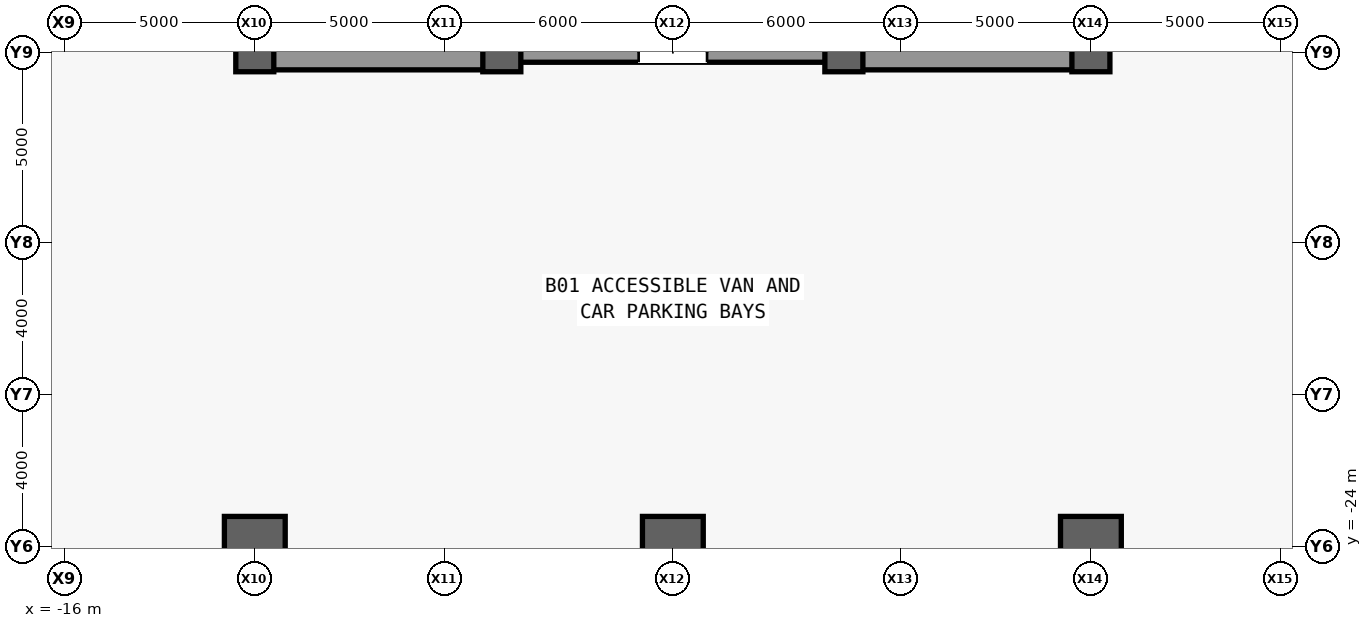
"""IFC4 building model, lengths in metres.
Left out: names, types, materials, properties, quantities, classifications, styles, units other than length and angle.
Written with IfcOpenShell. Run it as: python <this file> out.ifc"""

import sys

from ifc_helpers import new_model, si_unit, direction, frame, frame_2d, origin, origin_2d, place, context, subcontext, project, spatial, rectangle, extrude, source, transform, mapped, element, fill, save


model = new_model("IFC4")
c1 = context("Model", 3, precision=1e-05, world=origin(), true_north=direction((0.0, 1.0)))
c2 = subcontext(c1, "Body", "Model", "MODEL_VIEW")
j1 = project(units=[si_unit("LENGTHUNIT", "METRE"), si_unit("PLANEANGLEUNIT", "RADIAN")], contexts=[c1])
p1 = place(None, origin())
s1 = spatial("IfcSite", under=j1, at=p1, CompositionType="ELEMENT")
p2 = place(p1, origin())
s2 = spatial("IfcBuilding", under=s1, at=p2, CompositionType="ELEMENT")
p3 = place(p2, frame((0.0, 0.0, -4.8)))
s3 = spatial("IfcBuildingStorey", under=s2, at=p3, CompositionType="ELEMENT", Elevation=-4.8)
m1 = source(origin(), c2, "Body", "SweptSolid", [
    extrude(rectangle(XDim=22.0, YDim=0.6, at=frame_2d((11.0, 0.0))), origin(), (0.0, 0.0, 1.0), 4.48),
])
p4 = place(p3, frame((-11.0, -11.0, 0.0), z_axis=(0.0, 0.0, 1.0), x_axis=(0.0, 1.0, 0.0)))
e1 = element("IfcWall", 1, at=p4, inside=s3, PredefinedType="SHEAR", context=c2, shape_type="MappedRepresentation", body=[
    mapped(m1, transform((0.0, 0.0, 0.0), scale=1.0)),
])
m2 = source(origin(), c2, "Body", "SweptSolid", [
    extrude(rectangle(XDim=1.1, YDim=2.2, at=frame_2d((0.55, 1.1))), frame((0.0, 0.31, 0.0), z_axis=(0.0, -1.0, 0.0), x_axis=(1.0, 0.0, 0.0)), (0.0, 0.0, 1.0), 0.62),
])
p5 = place(p4, frame((0.8, 0.0, 0.0)))
e2 = element("IfcOpeningElement", 2, at=p5, cuts=e1, PredefinedType="OPENING", context=c2, shape_type="MappedRepresentation", body=[
    mapped(m2, transform((0.0, 0.0, 0.0), scale=1.0)),
])
p6 = place(p4, frame((12.5, 0.0, 0.0)))
e3 = element("IfcOpeningElement", 3, at=p6, cuts=e1, PredefinedType="OPENING", context=c2, shape_type="MappedRepresentation", body=[
    mapped(m2, transform((0.0, 0.0, 0.0), scale=1.0)),
])
m3 = source(origin(), c2, "Body", "SweptSolid", [
    extrude(rectangle(XDim=0.9, YDim=2.15, at=frame_2d((0.45, 1.075))), frame((0.0, 0.31, 0.0), z_axis=(0.0, -1.0, 0.0), x_axis=(1.0, 0.0, 0.0)), (0.0, 0.0, 1.0), 0.62),
])
p7 = place(p4, frame((7.575, 0.0, 0.0)))
e4 = element("IfcOpeningElement", 4, at=p7, cuts=e1, PredefinedType="OPENING", context=c2, shape_type="MappedRepresentation", body=[
    mapped(m3, transform((0.0, 0.0, 0.0), scale=1.0)),
])
m4 = source(origin(), c2, "Body", "SweptSolid", [
    extrude(rectangle(XDim=1.3, YDim=2.3, at=frame_2d((0.65, 1.15))), frame((0.0, 0.31, 0.0), z_axis=(0.0, -1.0, 0.0), x_axis=(1.0, 0.0, 0.0)), (0.0, 0.0, 1.0), 0.62),
])
p8 = place(p4, frame((2.7, 0.0, 0.0)))
e5 = element("IfcOpeningElement", 5, at=p8, cuts=e1, PredefinedType="OPENING", context=c2, shape_type="MappedRepresentation", body=[
    mapped(m4, transform((0.0, 0.0, 0.0), scale=1.0)),
])
p9 = place(p3, frame((11.0, -11.0, 0.0), z_axis=(0.0, 0.0, 1.0), x_axis=(0.0, 1.0, 0.0)))
e6 = element("IfcWall", 6, at=p9, inside=s3, PredefinedType="SHEAR", context=c2, shape_type="MappedRepresentation", body=[
    mapped(m1, transform((0.0, 0.0, 0.0), scale=1.0)),
])
p10 = place(p9, frame((0.8, 0.0, 0.0)))
e7 = element("IfcOpeningElement", 7, at=p10, cuts=e6, PredefinedType="OPENING", context=c2, shape_type="MappedRepresentation", body=[
    mapped(m2, transform((0.0, 0.0, 0.0), scale=1.0)),
])
p11 = place(p9, frame((7.575, 0.0, 0.0)))
e8 = element("IfcOpeningElement", 8, at=p11, cuts=e6, PredefinedType="OPENING", context=c2, shape_type="MappedRepresentation", body=[
    mapped(m3, transform((0.0, 0.0, 0.0), scale=1.0)),
])
p12 = place(p9, frame((2.7, 0.0, 0.0)))
e9 = element("IfcOpeningElement", 9, at=p12, cuts=e6, PredefinedType="OPENING", context=c2, shape_type="MappedRepresentation", body=[
    mapped(m4, transform((0.0, 0.0, 0.0), scale=1.0)),
])
p13 = place(p9, frame((13.35, 0.0, 0.0)))
e10 = element("IfcOpeningElement", 10, at=p13, cuts=e6, PredefinedType="OPENING", context=c2, shape_type="MappedRepresentation", body=[
    mapped(m4, transform((0.0, 0.0, 0.0), scale=1.0)),
])
m5 = source(origin(), c2, "Body", "SweptSolid", [
    extrude(rectangle(XDim=5.85, YDim=0.9, at=frame_2d((2.925, 0.0))), origin(), (0.0, 0.0, 1.0), 4.48),
])
for number, where, z_axis, x_axis in (
    (11, (-10.7, -11.0, 0.0), (0.0, 0.0, 1.0), (1.0, 0.0, 0.0)),
    (12, (4.85, -11.0, 0.0), (0.0, 0.0, 1.0), (1.0, 0.0, 0.0)),
):
    element("IfcWall", number, at=place(p3, frame(where, z_axis=z_axis, x_axis=x_axis)), inside=s3, PredefinedType="SHEAR", context=c2, shape_type="MappedRepresentation", body=[
        mapped(m5, transform((0.0, 0.0, 0.0), scale=1.0)),
    ])
m6 = source(origin(), c2, "Body", "SweptSolid", [
    extrude(rectangle(XDim=9.2, YDim=0.5, at=frame_2d((4.6, 0.0))), origin(), (0.0, 0.0, 1.0), 4.48),
])
p14 = place(p3, frame((-4.6, -11.0, 0.0), z_axis=(0.0, 0.0, 1.0), x_axis=(1.0, 0.0, 0.0)))
e13 = element("IfcWall", 13, at=p14, inside=s3, PredefinedType="SHEAR", context=c2, shape_type="MappedRepresentation", body=[
    mapped(m6, transform((0.0, 0.0, 0.0), scale=1.0)),
])
m7 = source(origin(), c2, "Body", "SweptSolid", [
    extrude(rectangle(XDim=1.8, YDim=2.25, at=frame_2d((0.9, 1.125))), frame((0.0, 0.26, 0.0), z_axis=(0.0, -1.0, 0.0), x_axis=(1.0, 0.0, 0.0)), (0.0, 0.0, 1.0), 0.52),
])
p15 = place(p14, frame((3.7, 0.0, 0.0)))
e14 = element("IfcOpeningElement", 14, at=p15, cuts=e13, PredefinedType="OPENING", context=c2, shape_type="MappedRepresentation", body=[
    mapped(m7, transform((0.0, 0.0, 0.0), scale=1.0)),
])
m8 = source(origin(), c2, "Body", "SweptSolid", [
    extrude(rectangle(XDim=1.6, YDim=1.6, at=origin_2d()), origin(), (0.0, 0.0, 1.0), 4.8),
])
p16 = place(p3, frame((-11.0, -24.0, 0.0), z_axis=(0.0, 0.0, 1.0), x_axis=(1.0, 0.0, 0.0)))
e15 = element("IfcColumn", 15, at=p16, inside=s3, PredefinedType="COLUMN", context=c2, shape_type="MappedRepresentation", body=[
    mapped(m8, transform((0.0, 0.0, 0.0), scale=1.0)),
])
m9 = source(origin(), c2, "Body", "SweptSolid", [
    extrude(rectangle(XDim=1.0, YDim=1.0, at=origin_2d()), origin(), (0.0, 0.0, 1.0), 4.8),
])
for number, where, z_axis, x_axis in (
    (16, (-11.0, -11.0, 0.0), (0.0, 0.0, 1.0), (1.0, 0.0, 0.0)),
    (17, (-4.5, -11.0, 0.0), (0.0, 0.0, 1.0), (1.0, 0.0, 0.0)),
):
    element("IfcColumn", number, at=place(p3, frame(where, z_axis=z_axis, x_axis=x_axis)), inside=s3, PredefinedType="COLUMN", context=c2, shape_type="MappedRepresentation", body=[
        mapped(m9, transform((0.0, 0.0, 0.0), scale=1.0)),
    ])
p17 = place(p3, frame((0.0, -24.0, 0.0), z_axis=(0.0, 0.0, 1.0), x_axis=(1.0, 0.0, 0.0)))
e18 = element("IfcColumn", 18, at=p17, inside=s3, PredefinedType="COLUMN", context=c2, shape_type="MappedRepresentation", body=[
    mapped(m8, transform((0.0, 0.0, 0.0), scale=1.0)),
])
p18 = place(p3, frame((4.5, -11.0, 0.0), z_axis=(0.0, 0.0, 1.0), x_axis=(1.0, 0.0, 0.0)))
e19 = element("IfcColumn", 19, at=p18, inside=s3, PredefinedType="COLUMN", context=c2, shape_type="MappedRepresentation", body=[
    mapped(m9, transform((0.0, 0.0, 0.0), scale=1.0)),
])
p19 = place(p3, frame((11.0, -24.0, 0.0), z_axis=(0.0, 0.0, 1.0), x_axis=(1.0, 0.0, 0.0)))
e20 = element("IfcColumn", 20, at=p19, inside=s3, PredefinedType="COLUMN", context=c2, shape_type="MappedRepresentation", body=[
    mapped(m8, transform((0.0, 0.0, 0.0), scale=1.0)),
])
p20 = place(p3, frame((11.0, -11.0, 0.0), z_axis=(0.0, 0.0, 1.0), x_axis=(1.0, 0.0, 0.0)))
e21 = element("IfcColumn", 21, at=p20, inside=s3, PredefinedType="COLUMN", context=c2, shape_type="MappedRepresentation", body=[
    mapped(m9, transform((0.0, 0.0, 0.0), scale=1.0)),
])
m10 = source(origin(), c2, "Body", "SweptSolid", [
    extrude(rectangle(XDim=1.8, YDim=2.25, at=frame_2d((0.9, 1.125))), frame((0.0, 0.025, 0.0), z_axis=(0.0, -1.0, 0.0), x_axis=(1.0, 0.0, 0.0)), (0.0, 0.0, 1.0), 0.05),
])
p21 = place(p15, origin())
e22 = element("IfcDoor", 22, at=p21, inside=s3, OperationType="SINGLE_SWING_LEFT", PredefinedType="DOOR", context=c2, shape_type="MappedRepresentation", body=[
    mapped(m10, transform((0.0, 0.0, 0.0), scale=1.0)),
])
fill(e14, e22)
save(model, sys.argv[1])
